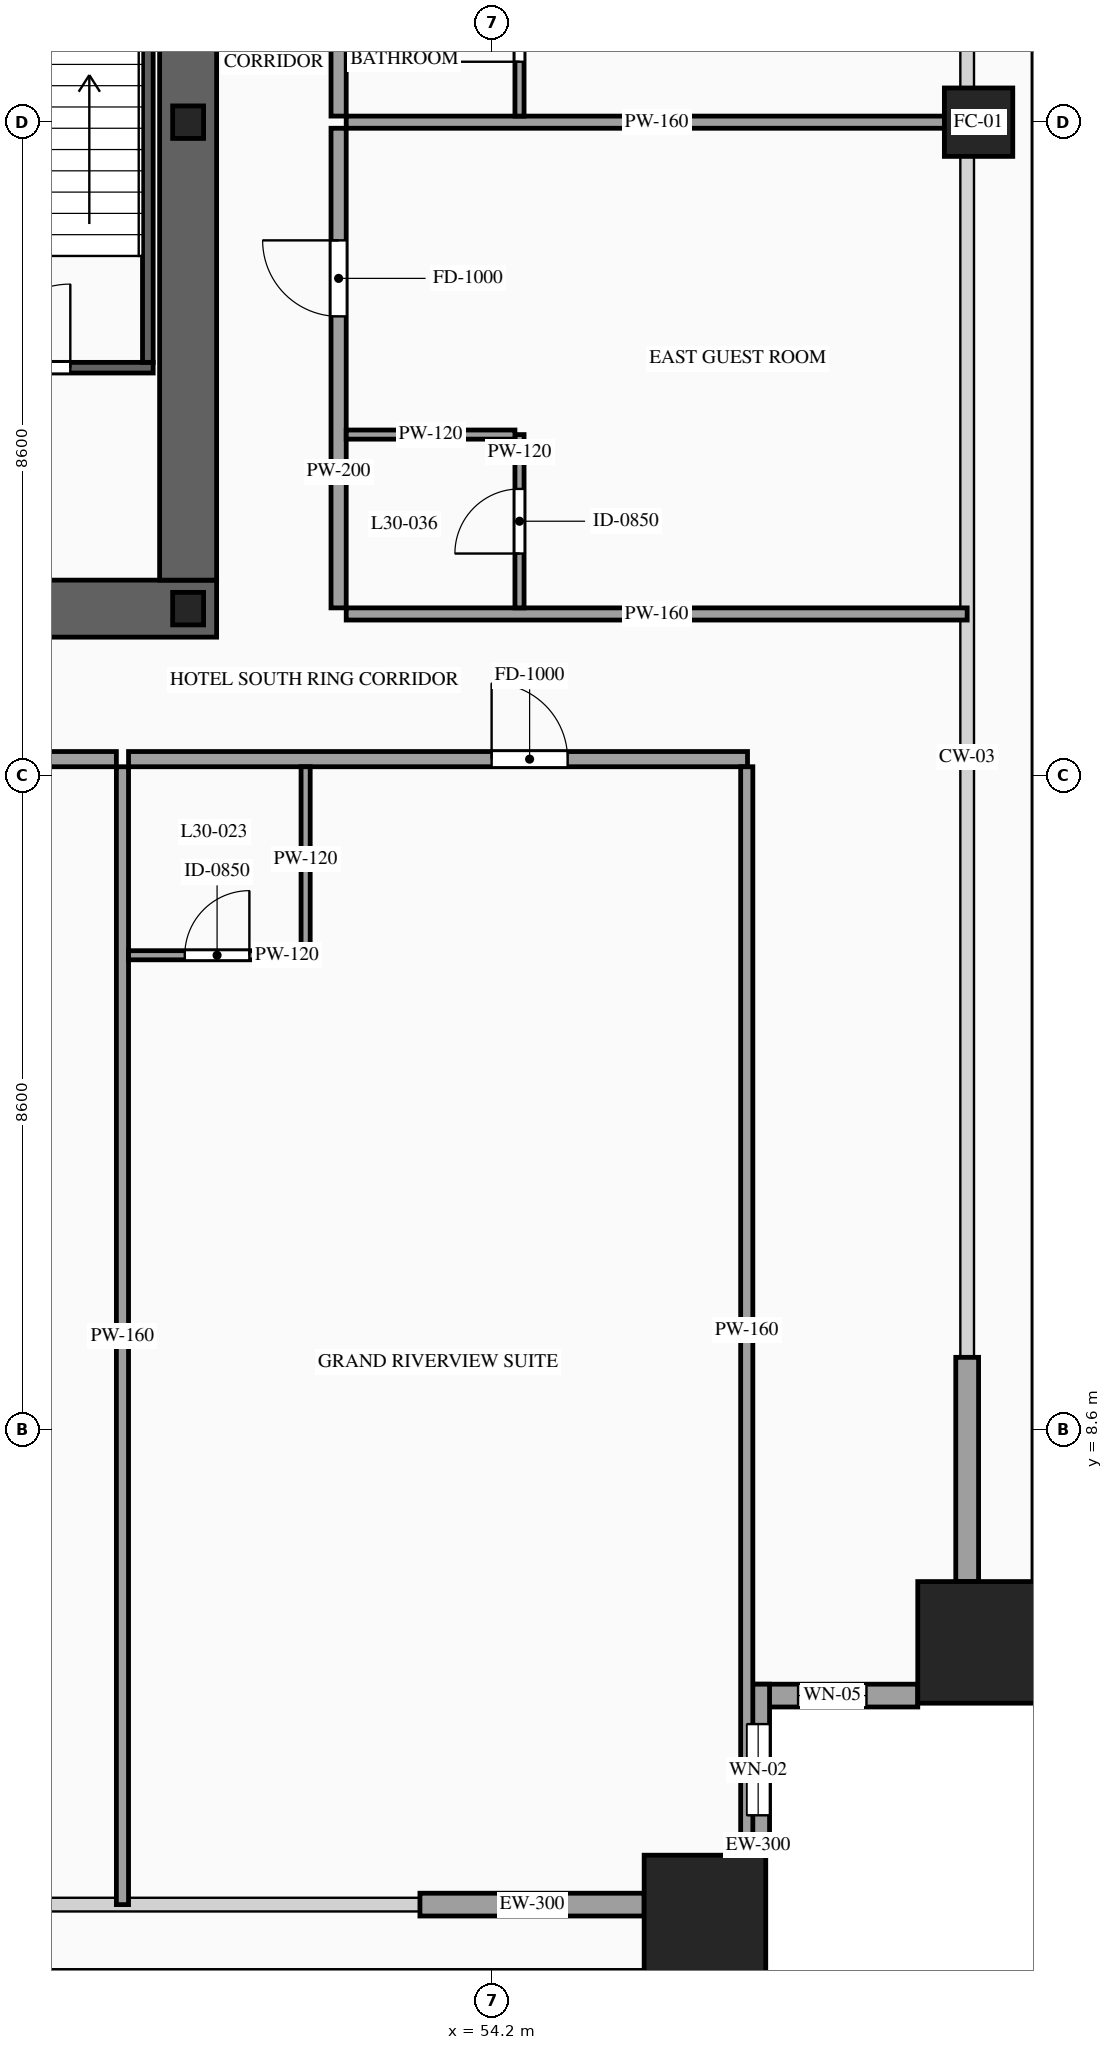
"""IFC4 building model, lengths in metres.
Left out: names, types, materials, properties, quantities, classifications, styles, units other than length and angle.
Written with IfcOpenShell. Run it as: python <this file> out.ifc"""

import sys

from ifc_helpers import new_model, si_unit, direction, frame, frame_2d, origin, origin_2d, place, context, subcontext, project, spatial, rectangle, hollow_rectangle, i_section, extrude, source, transform, mapped, element, fill, save


model = new_model("IFC4")
c1 = context("Model", 3, precision=1e-05, world=origin(), true_north=direction((0.0, 1.0)))
c2 = subcontext(c1, "Body", "Model", "MODEL_VIEW")
j1 = project(units=[si_unit("LENGTHUNIT", "METRE"), si_unit("PLANEANGLEUNIT", "RADIAN")], contexts=[c1])
p1 = place(None, origin())
s1 = spatial("IfcSite", under=j1, at=p1, CompositionType="ELEMENT")
p2 = place(p1, origin())
s2 = spatial("IfcBuilding", under=s1, at=p2, CompositionType="ELEMENT")
p3 = place(p2, frame((0.0, 0.0, 115.4)))
s3 = spatial("IfcBuildingStorey", under=s2, at=p3, CompositionType="ELEMENT", Elevation=115.4)
p4 = place(p3, frame((23.425, 19.4, 0.0), z_axis=(0.0, 0.0, 1.0), x_axis=(1.0, 0.0, 0.0)))
e1 = element("IfcWall", 1, at=p4, inside=s3, PredefinedType="SHEAR", context=c2, shape_type="SweptSolid", body=[
    extrude(rectangle(XDim=27.15, YDim=0.75, at=frame_2d((13.575, 0.0))), origin(), (0.0, 0.0, 1.0), 3.6),
])
p5 = place(p4, frame((2.025, 0.0, 0.0)))
e2 = element("IfcOpeningElement", 2, at=p5, cuts=e1, PredefinedType="OPENING", context=c2, shape_type="SweptSolid", body=[
    extrude(rectangle(XDim=1.1, YDim=2.2, at=frame_2d((0.55, 1.1))), frame((0.0, 0.39, 0.0), z_axis=(0.0, -1.0, 0.0), x_axis=(1.0, 0.0, 0.0)), (0.0, 0.0, 1.0), 0.78),
])
p6 = place(p4, frame((9.925, 0.0, 0.0)))
e3 = element("IfcOpeningElement", 3, at=p6, cuts=e1, PredefinedType="OPENING", context=c2, shape_type="SweptSolid", body=[
    extrude(rectangle(XDim=1.1, YDim=2.2, at=frame_2d((0.55, 1.1))), frame((0.0, 0.39, 0.0), z_axis=(0.0, -1.0, 0.0), x_axis=(1.0, 0.0, 0.0)), (0.0, 0.0, 1.0), 0.78),
])
p7 = place(p4, frame((23.125, 0.0, 0.0)))
e4 = element("IfcOpeningElement", 4, at=p7, cuts=e1, PredefinedType="OPENING", context=c2, shape_type="SweptSolid", body=[
    extrude(rectangle(XDim=1.1, YDim=2.2, at=frame_2d((0.55, 1.1))), frame((0.0, 0.39, 0.0), z_axis=(0.0, -1.0, 0.0), x_axis=(1.0, 0.0, 0.0)), (0.0, 0.0, 1.0), 0.78),
])
p8 = place(p4, frame((19.745, 0.0, 0.0)))
e5 = element("IfcOpeningElement", 5, at=p8, cuts=e1, PredefinedType="OPENING", context=c2, shape_type="SweptSolid", body=[
    extrude(rectangle(XDim=0.9, YDim=2.15, at=frame_2d((0.45, 1.075))), frame((0.0, 0.39, 0.0), z_axis=(0.0, -1.0, 0.0), x_axis=(1.0, 0.0, 0.0)), (0.0, 0.0, 1.0), 0.78),
])
p9 = place(p4, frame((18.305, 0.0, 0.0)))
e6 = element("IfcOpeningElement", 6, at=p9, cuts=e1, PredefinedType="OPENING", context=c2, shape_type="SweptSolid", body=[
    extrude(rectangle(XDim=0.9, YDim=2.15, at=frame_2d((0.45, 1.075))), frame((0.0, 0.39, 0.0), z_axis=(0.0, -1.0, 0.0), x_axis=(1.0, 0.0, 0.0)), (0.0, 0.0, 1.0), 0.78),
])
m1 = source(origin(), c2, "Body", "SweptSolid", [
    extrude(rectangle(XDim=12.05, YDim=0.75, at=frame_2d((6.025, 0.0))), origin(), (0.0, 0.0, 1.0), 3.6),
])
p10 = place(p3, frame((50.2, 19.775, 0.0), z_axis=(0.0, 0.0, 1.0), x_axis=(0.0, 1.0, 0.0)))
e7 = element("IfcWall", 7, at=p10, inside=s3, PredefinedType="SHEAR", context=c2, shape_type="MappedRepresentation", body=[
    mapped(m1, transform((0.0, 0.0, 0.0), scale=1.0)),
])
m2 = source(origin(), c2, "Body", "SweptSolid", [
    extrude(i_section(OverallWidth=0.407, OverallDepth=0.428, WebThickness=0.02, FlangeThickness=0.035, at=origin_2d()), origin(), (0.0, 0.0, 1.0), 3.6),
])
for number, where, z_axis, x_axis in (
    (8, (50.2, 19.4, 0.0), (0.0, 0.0, 1.0), (1.0, 0.0, 0.0)),
    (9, (50.2, 25.8, 0.0), (0.0, 0.0, 1.0), (1.0, 0.0, 0.0)),
):
    element("IfcColumn", number, at=place(p3, frame(where, z_axis=z_axis, x_axis=x_axis)), inside=s3, PredefinedType="COLUMN", context=c2, shape_type="MappedRepresentation", body=[
        mapped(m2, transform((0.0, 0.0, 0.0), scale=1.0)),
    ])
m3 = source(origin(), c2, "Body", "SweptSolid", [
    extrude(hollow_rectangle(XDim=1.6, YDim=1.6, WallThickness=0.07, at=origin_2d()), origin(), (0.0, 0.0, 1.0), 3.6),
])
for number, where, z_axis, x_axis in (
    (10, (57.0, 2.2, 0.0), (0.0, 0.0, 1.0), (1.0, 0.0, 0.0)),
    (11, (60.6, 5.8, 0.0), (0.0, 0.0, 1.0), (1.0, 0.0, 0.0)),
):
    element("IfcColumn", number, at=place(p3, frame(where, z_axis=z_axis, x_axis=x_axis)), inside=s3, PredefinedType="COLUMN", context=c2, shape_type="MappedRepresentation", body=[
        mapped(m3, transform((0.0, 0.0, 0.0), scale=1.0)),
    ])
m4 = source(origin(), c2, "Body", "SweptSolid", [
    extrude(hollow_rectangle(XDim=0.9, YDim=0.9, WallThickness=0.042, at=origin_2d()), origin(), (0.0, 0.0, 1.0), 3.6),
])
p11 = place(p3, frame((60.6, 25.8, 0.0), z_axis=(0.0, 0.0, 1.0), x_axis=(1.0, 0.0, 0.0)))
e12 = element("IfcColumn", 12, at=p11, inside=s3, PredefinedType="COLUMN", context=c2, shape_type="MappedRepresentation", body=[
    mapped(m4, transform((0.0, 0.0, 0.0), scale=1.0)),
])
p12 = place(p3, frame((57.55, 5.1, 0.0), z_axis=(0.0, 0.0, 1.0), x_axis=(1.0, 0.0, 0.0)))
e13 = element("IfcWall", 13, at=p12, inside=s3, PredefinedType="SOLIDWALL", context=c2, shape_type="SweptSolid", body=[
    extrude(rectangle(XDim=2.25, YDim=0.3, at=frame_2d((1.125, 0.0))), origin(), (0.0, 0.0, 1.0), 3.38),
])
p13 = place(p12, frame((0.675, 0.0, 0.85)))
e14 = element("IfcOpeningElement", 14, at=p13, cuts=e13, PredefinedType="OPENING", context=c2, shape_type="SweptSolid", body=[
    extrude(rectangle(XDim=0.9, YDim=1.5, at=frame_2d((0.45, 0.75))), frame((0.0, 0.165, 0.0), z_axis=(0.0, -1.0, 0.0), x_axis=(1.0, 0.0, 0.0)), (0.0, 0.0, 1.0), 0.33),
])
p14 = place(p3, frame((57.7, 3.0, 0.0), z_axis=(0.0, 0.0, 1.0), x_axis=(0.0, 1.0, 0.0)))
e15 = element("IfcWall", 15, at=p14, inside=s3, PredefinedType="SOLIDWALL", context=c2, shape_type="SweptSolid", body=[
    extrude(rectangle(XDim=2.25, YDim=0.3, at=frame_2d((1.125, 0.0))), origin(), (0.0, 0.0, 1.0), 3.38),
])
p15 = place(p14, frame((0.525, 0.0, 0.85)))
e16 = element("IfcOpeningElement", 16, at=p15, cuts=e15, PredefinedType="OPENING", context=c2, shape_type="SweptSolid", body=[
    extrude(rectangle(XDim=1.2, YDim=2.1, at=frame_2d((0.6, 1.05))), frame((0.0, 0.165, 0.0), z_axis=(0.0, -1.0, 0.0), x_axis=(1.0, 0.0, 0.0)), (0.0, 0.0, 1.0), 0.33),
])
m5 = source(origin(), c2, "Body", "SweptSolid", [
    extrude(rectangle(XDim=2.95, YDim=0.3, at=frame_2d((1.475, 0.0))), origin(), (0.0, 0.0, 1.0), 2.775),
])
for number, where, z_axis, x_axis in (
    (17, (53.25, 2.35, 0.0), (0.0, 0.0, 1.0), (1.0, 0.0, 0.0)),
    (18, (60.45, 6.6, 0.0), (0.0, 0.0, 1.0), (0.0, 1.0, 0.0)),
):
    element("IfcWall", number, at=place(p3, frame(where, z_axis=z_axis, x_axis=x_axis)), inside=s3, PredefinedType="SOLIDWALL", context=c2, shape_type="MappedRepresentation", body=[
        mapped(m5, transform((0.0, 0.0, 0.0), scale=1.0)),
    ])
p16 = place(p3, frame((46.46, 22.57, 0.0), z_axis=(0.0, 0.0, 1.0), x_axis=(1.0, 0.0, 0.0)))
e19 = element("IfcWall", 19, at=p16, inside=s3, PredefinedType="SOLIDWALL", context=c2, shape_type="SweptSolid", body=[
    extrude(rectangle(XDim=3.28, YDim=0.14, at=frame_2d((1.64, 0.0))), origin(), (0.0, 0.0, 1.0), 3.38),
])
p17 = place(p16, frame((1.09, 0.0, 0.0)))
e20 = element("IfcOpeningElement", 20, at=p17, cuts=e19, PredefinedType="OPENING", context=c2, shape_type="SweptSolid", body=[
    extrude(rectangle(XDim=1.1, YDim=2.2, at=frame_2d((0.55, 1.1))), frame((0.0, 0.085, 0.0), z_axis=(0.0, -1.0, 0.0), x_axis=(1.0, 0.0, 0.0)), (0.0, 0.0, 1.0), 0.17),
])
m6 = source(origin(), c2, "Body", "SweptSolid", [
    extrude(rectangle(XDim=8.94, YDim=0.14, at=frame_2d((4.47, 0.0))), origin(), (0.0, 0.0, 1.0), 3.38),
])
p18 = place(p3, frame((49.67, 22.64, 0.0), z_axis=(0.0, 0.0, 1.0), x_axis=(0.0, 1.0, 0.0)))
e21 = element("IfcWall", 21, at=p18, inside=s3, PredefinedType="SOLIDWALL", context=c2, shape_type="MappedRepresentation", body=[
    mapped(m6, transform((0.0, 0.0, 0.0), scale=1.0)),
])
p19 = place(p3, frame((35.846, 17.42, 0.0), z_axis=(0.0, 0.0, 1.0), x_axis=(1.0, 0.0, 0.0)))
e22 = element("IfcWall", 22, at=p19, inside=s3, PredefinedType="PARTITIONING", context=c2, shape_type="SweptSolid", body=[
    extrude(rectangle(XDim=13.41, YDim=0.2, at=frame_2d((6.705, 0.0))), origin(), (0.0, 0.0, 1.0), 3.38),
])
p20 = place(p19, frame((6.205, 0.0, 0.0)))
e23 = element("IfcOpeningElement", 23, at=p20, cuts=e22, PredefinedType="OPENING", context=c2, shape_type="SweptSolid", body=[
    extrude(rectangle(XDim=1.0, YDim=2.2, at=frame_2d((0.5, 1.1))), frame((0.0, 0.115, 0.0), z_axis=(0.0, -1.0, 0.0), x_axis=(1.0, 0.0, 0.0)), (0.0, 0.0, 1.0), 0.23),
])
m7 = source(origin(), c2, "Body", "SweptSolid", [
    extrude(rectangle(XDim=14.97, YDim=0.16, at=frame_2d((7.485, 0.0))), origin(), (0.0, 0.0, 1.0), 3.38),
])
p21 = place(p3, frame((49.336, 2.35, 0.0), z_axis=(0.0, 0.0, 1.0), x_axis=(0.0, 1.0, 0.0)))
e24 = element("IfcWall", 24, at=p21, inside=s3, PredefinedType="PARTITIONING", context=c2, shape_type="MappedRepresentation", body=[
    mapped(m7, transform((0.0, 0.0, 0.0), scale=1.0)),
])
p22 = place(p3, frame((49.416, 17.42, 0.0), z_axis=(0.0, 0.0, 1.0), x_axis=(1.0, 0.0, 0.0)))
e25 = element("IfcWall", 25, at=p22, inside=s3, PredefinedType="PARTITIONING", context=c2, shape_type="SweptSolid", body=[
    extrude(rectangle(XDim=8.144, YDim=0.2, at=frame_2d((4.072, 0.0))), origin(), (0.0, 0.0, 1.0), 3.38),
])
p23 = place(p22, frame((4.777, 0.0, 0.0)))
e26 = element("IfcOpeningElement", 26, at=p23, cuts=e25, PredefinedType="OPENING", context=c2, shape_type="SweptSolid", body=[
    extrude(rectangle(XDim=1.0, YDim=2.2, at=frame_2d((0.5, 1.1))), frame((0.0, 0.115, 0.0), z_axis=(0.0, -1.0, 0.0), x_axis=(1.0, 0.0, 0.0)), (0.0, 0.0, 1.0), 0.23),
])
m8 = source(origin(), c2, "Body", "SweptSolid", [
    extrude(rectangle(XDim=14.82, YDim=0.16, at=frame_2d((7.41, 0.0))), origin(), (0.0, 0.0, 1.0), 3.38),
])
p24 = place(p3, frame((57.55, 2.5, 0.0), z_axis=(0.0, 0.0, 1.0), x_axis=(0.0, 1.0, 0.0)))
e27 = element("IfcWall", 27, at=p24, inside=s3, PredefinedType="PARTITIONING", context=c2, shape_type="MappedRepresentation", body=[
    mapped(m8, transform((0.0, 0.0, 0.0), scale=1.0)),
])
p25 = place(p3, frame((49.416, 14.84, 0.0), z_axis=(0.0, 0.0, 1.0), x_axis=(1.0, 0.0, 0.0)))
e28 = element("IfcWall", 28, at=p25, inside=s3, PredefinedType="PARTITIONING", context=c2, shape_type="SweptSolid", body=[
    extrude(rectangle(XDim=2.33, YDim=0.12, at=frame_2d((1.165, 0.0))), origin(), (0.0, 0.0, 1.0), 3.38),
])
p26 = place(p25, frame((0.74, 0.0, 0.0)))
e29 = element("IfcOpeningElement", 29, at=p26, cuts=e28, PredefinedType="OPENING", context=c2, shape_type="SweptSolid", body=[
    extrude(rectangle(XDim=0.85, YDim=2.1, at=frame_2d((0.425, 1.05))), frame((0.0, 0.075, 0.0), z_axis=(0.0, -1.0, 0.0), x_axis=(1.0, 0.0, 0.0)), (0.0, 0.0, 1.0), 0.15),
])
m9 = source(origin(), c2, "Body", "SweptSolid", [
    extrude(rectangle(XDim=2.42, YDim=0.12, at=frame_2d((1.21, 0.0))), origin(), (0.0, 0.0, 1.0), 3.38),
])
p27 = place(p3, frame((51.746, 14.9, 0.0), z_axis=(0.0, 0.0, 1.0), x_axis=(0.0, 1.0, 0.0)))
e30 = element("IfcWall", 30, at=p27, inside=s3, PredefinedType="PARTITIONING", context=c2, shape_type="MappedRepresentation", body=[
    mapped(m9, transform((0.0, 0.0, 0.0), scale=1.0)),
])
p28 = place(p3, frame((52.18, 19.41, 0.0), z_axis=(0.0, 0.0, 1.0), x_axis=(0.0, 1.0, 0.0)))
e31 = element("IfcWall", 31, at=p28, inside=s3, PredefinedType="PARTITIONING", context=c2, shape_type="SweptSolid", body=[
    extrude(rectangle(XDim=6.31, YDim=0.2, at=frame_2d((3.155, 0.0))), origin(), (0.0, 0.0, 1.0), 3.38),
])
p29 = place(p28, frame((3.835, 0.0, 0.0)))
e32 = element("IfcOpeningElement", 32, at=p29, cuts=e31, PredefinedType="OPENING", context=c2, shape_type="SweptSolid", body=[
    extrude(rectangle(XDim=1.0, YDim=2.2, at=frame_2d((0.5, 1.1))), frame((0.0, 0.115, 0.0), z_axis=(0.0, -1.0, 0.0), x_axis=(1.0, 0.0, 0.0)), (0.0, 0.0, 1.0), 0.23),
])
m10 = source(origin(), c2, "Body", "SweptSolid", [
    extrude(rectangle(XDim=8.17, YDim=0.16, at=frame_2d((4.085, 0.0))), origin(), (0.0, 0.0, 1.0), 2.675),
])
p30 = place(p3, frame((52.28, 25.8, 0.0), z_axis=(0.0, 0.0, 1.0), x_axis=(1.0, 0.0, 0.0)))
e33 = element("IfcWall", 33, at=p30, inside=s3, PredefinedType="PARTITIONING", context=c2, shape_type="MappedRepresentation", body=[
    mapped(m10, transform((0.0, 0.0, 0.0), scale=1.0)),
])
m11 = source(origin(), c2, "Body", "SweptSolid", [
    extrude(rectangle(XDim=8.17, YDim=0.16, at=frame_2d((4.085, 0.0))), origin(), (0.0, 0.0, 1.0), 2.875),
])
p31 = place(p3, frame((52.28, 19.33, 0.0), z_axis=(0.0, 0.0, 1.0), x_axis=(1.0, 0.0, 0.0)))
e34 = element("IfcWall", 34, at=p31, inside=s3, PredefinedType="PARTITIONING", context=c2, shape_type="MappedRepresentation", body=[
    mapped(m11, transform((0.0, 0.0, 0.0), scale=1.0)),
])
p32 = place(p3, frame((54.56, 19.41, 0.0), z_axis=(0.0, 0.0, 1.0), x_axis=(0.0, 1.0, 0.0)))
e35 = element("IfcWall", 35, at=p32, inside=s3, PredefinedType="PARTITIONING", context=c2, shape_type="SweptSolid", body=[
    extrude(rectangle(XDim=2.28, YDim=0.12, at=frame_2d((1.14, 0.0))), origin(), (0.0, 0.0, 1.0), 3.38),
])
p33 = place(p32, frame((0.715, 0.0, 0.0)))
e36 = element("IfcOpeningElement", 36, at=p33, cuts=e35, PredefinedType="OPENING", context=c2, shape_type="SweptSolid", body=[
    extrude(rectangle(XDim=0.85, YDim=2.1, at=frame_2d((0.425, 1.05))), frame((0.0, 0.075, 0.0), z_axis=(0.0, -1.0, 0.0), x_axis=(1.0, 0.0, 0.0)), (0.0, 0.0, 1.0), 0.15),
])
m12 = source(origin(), c2, "Body", "SweptSolid", [
    extrude(rectangle(XDim=2.22, YDim=0.12, at=frame_2d((1.11, 0.0))), origin(), (0.0, 0.0, 1.0), 3.38),
])
p34 = place(p3, frame((52.28, 21.69, 0.0), z_axis=(0.0, 0.0, 1.0), x_axis=(1.0, 0.0, 0.0)))
e37 = element("IfcWall", 37, at=p34, inside=s3, PredefinedType="PARTITIONING", context=c2, shape_type="MappedRepresentation", body=[
    mapped(m12, transform((0.0, 0.0, 0.0), scale=1.0)),
])
p35 = place(p3, frame((52.18, 25.88, 0.0), z_axis=(0.0, 0.0, 1.0), x_axis=(0.0, 1.0, 0.0)))
e38 = element("IfcWall", 38, at=p35, inside=s3, PredefinedType="PARTITIONING", context=c2, shape_type="SweptSolid", body=[
    extrude(rectangle(XDim=6.31, YDim=0.2, at=frame_2d((3.155, 0.0))), origin(), (0.0, 0.0, 1.0), 3.38),
])
p36 = place(p35, frame((3.835, 0.0, 0.0)))
e39 = element("IfcOpeningElement", 39, at=p36, cuts=e38, PredefinedType="OPENING", context=c2, shape_type="SweptSolid", body=[
    extrude(rectangle(XDim=1.0, YDim=2.2, at=frame_2d((0.5, 1.1))), frame((0.0, 0.115, 0.0), z_axis=(0.0, -1.0, 0.0), x_axis=(1.0, 0.0, 0.0)), (0.0, 0.0, 1.0), 0.23),
])
p37 = place(p3, frame((54.56, 25.88, 0.0), z_axis=(0.0, 0.0, 1.0), x_axis=(0.0, 1.0, 0.0)))
e40 = element("IfcWall", 40, at=p37, inside=s3, PredefinedType="PARTITIONING", context=c2, shape_type="SweptSolid", body=[
    extrude(rectangle(XDim=2.28, YDim=0.12, at=frame_2d((1.14, 0.0))), origin(), (0.0, 0.0, 1.0), 3.38),
])
p38 = place(p37, frame((0.715, 0.0, 0.0)))
e41 = element("IfcOpeningElement", 41, at=p38, cuts=e40, PredefinedType="OPENING", context=c2, shape_type="SweptSolid", body=[
    extrude(rectangle(XDim=0.85, YDim=2.1, at=frame_2d((0.425, 1.05))), frame((0.0, 0.075, 0.0), z_axis=(0.0, -1.0, 0.0), x_axis=(1.0, 0.0, 0.0)), (0.0, 0.0, 1.0), 0.15),
])
m13 = source(origin(), c2, "Body", "SweptSolid", [
    extrude(rectangle(XDim=0.9, YDim=1.5, at=frame_2d((0.45, 0.75))), frame((0.0, 0.03, 0.0), z_axis=(0.0, -1.0, 0.0), x_axis=(1.0, 0.0, 0.0)), (0.0, 0.0, 1.0), 0.06),
])
p39 = place(p13, origin())
e42 = element("IfcWindow", 42, at=p39, inside=s3, PartitioningType="SINGLE_PANEL", PredefinedType="WINDOW", context=c2, shape_type="MappedRepresentation", body=[
    mapped(m13, transform((0.0, 0.0, 0.0), scale=1.0)),
])
fill(e14, e42)
m14 = source(origin(), c2, "Body", "SweptSolid", [
    extrude(rectangle(XDim=1.2, YDim=2.1, at=frame_2d((0.6, 1.05))), frame((0.0, 0.03, 0.0), z_axis=(0.0, -1.0, 0.0), x_axis=(1.0, 0.0, 0.0)), (0.0, 0.0, 1.0), 0.06),
])
p40 = place(p15, origin())
e43 = element("IfcWindow", 43, at=p40, inside=s3, PartitioningType="SINGLE_PANEL", PredefinedType="WINDOW", context=c2, shape_type="MappedRepresentation", body=[
    mapped(m14, transform((0.0, 0.0, 0.0), scale=1.0)),
])
fill(e16, e43)
m15 = source(origin(), c2, "Body", "SweptSolid", [
    extrude(rectangle(XDim=1.1, YDim=2.2, at=frame_2d((0.55, 1.1))), frame((0.0, 0.025, 0.0), z_axis=(0.0, -1.0, 0.0), x_axis=(1.0, 0.0, 0.0)), (0.0, 0.0, 1.0), 0.05),
])
p41 = place(p17, origin())
e44 = element("IfcDoor", 44, at=p41, inside=s3, OperationType="SINGLE_SWING_RIGHT", PredefinedType="DOOR", context=c2, shape_type="MappedRepresentation", body=[
    mapped(m15, transform((0.0, 0.0, 0.0), scale=1.0)),
])
fill(e20, e44)
m16 = source(origin(), c2, "Body", "SweptSolid", [
    extrude(rectangle(XDim=1.0, YDim=2.2, at=frame_2d((0.5, 1.1))), frame((0.0, 0.025, 0.0), z_axis=(0.0, -1.0, 0.0), x_axis=(1.0, 0.0, 0.0)), (0.0, 0.0, 1.0), 0.05),
])
p42 = place(p23, origin())
e45 = element("IfcDoor", 45, at=p42, inside=s3, OperationType="SINGLE_SWING_LEFT", PredefinedType="DOOR", context=c2, shape_type="MappedRepresentation", body=[
    mapped(m16, transform((0.0, 0.0, 0.0), scale=1.0)),
])
fill(e26, e45)
m17 = source(origin(), c2, "Body", "SweptSolid", [
    extrude(rectangle(XDim=0.85, YDim=2.1, at=frame_2d((0.425, 1.05))), frame((0.0, 0.025, 0.0), z_axis=(0.0, -1.0, 0.0), x_axis=(1.0, 0.0, 0.0)), (0.0, 0.0, 1.0), 0.05),
])
p43 = place(p26, origin())
e46 = element("IfcDoor", 46, at=p43, inside=s3, OperationType="SINGLE_SWING_RIGHT", PredefinedType="DOOR", context=c2, shape_type="MappedRepresentation", body=[
    mapped(m17, transform((0.0, 0.0, 0.0), scale=1.0)),
])
fill(e29, e46)
p44 = place(p29, origin())
e47 = element("IfcDoor", 47, at=p44, inside=s3, OperationType="SINGLE_SWING_RIGHT", PredefinedType="DOOR", context=c2, shape_type="MappedRepresentation", body=[
    mapped(m16, transform((0.0, 0.0, 0.0), scale=1.0)),
])
fill(e32, e47)
p45 = place(p33, origin())
e48 = element("IfcDoor", 48, at=p45, inside=s3, OperationType="SINGLE_SWING_LEFT", PredefinedType="DOOR", context=c2, shape_type="MappedRepresentation", body=[
    mapped(m17, transform((0.0, 0.0, 0.0), scale=1.0)),
])
fill(e36, e48)
p46 = place(p38, origin())
e49 = element("IfcDoor", 49, at=p46, inside=s3, OperationType="SINGLE_SWING_LEFT", PredefinedType="DOOR", context=c2, shape_type="MappedRepresentation", body=[
    mapped(m17, transform((0.0, 0.0, 0.0), scale=1.0)),
])
fill(e41, e49)
save(model, sys.argv[1])
